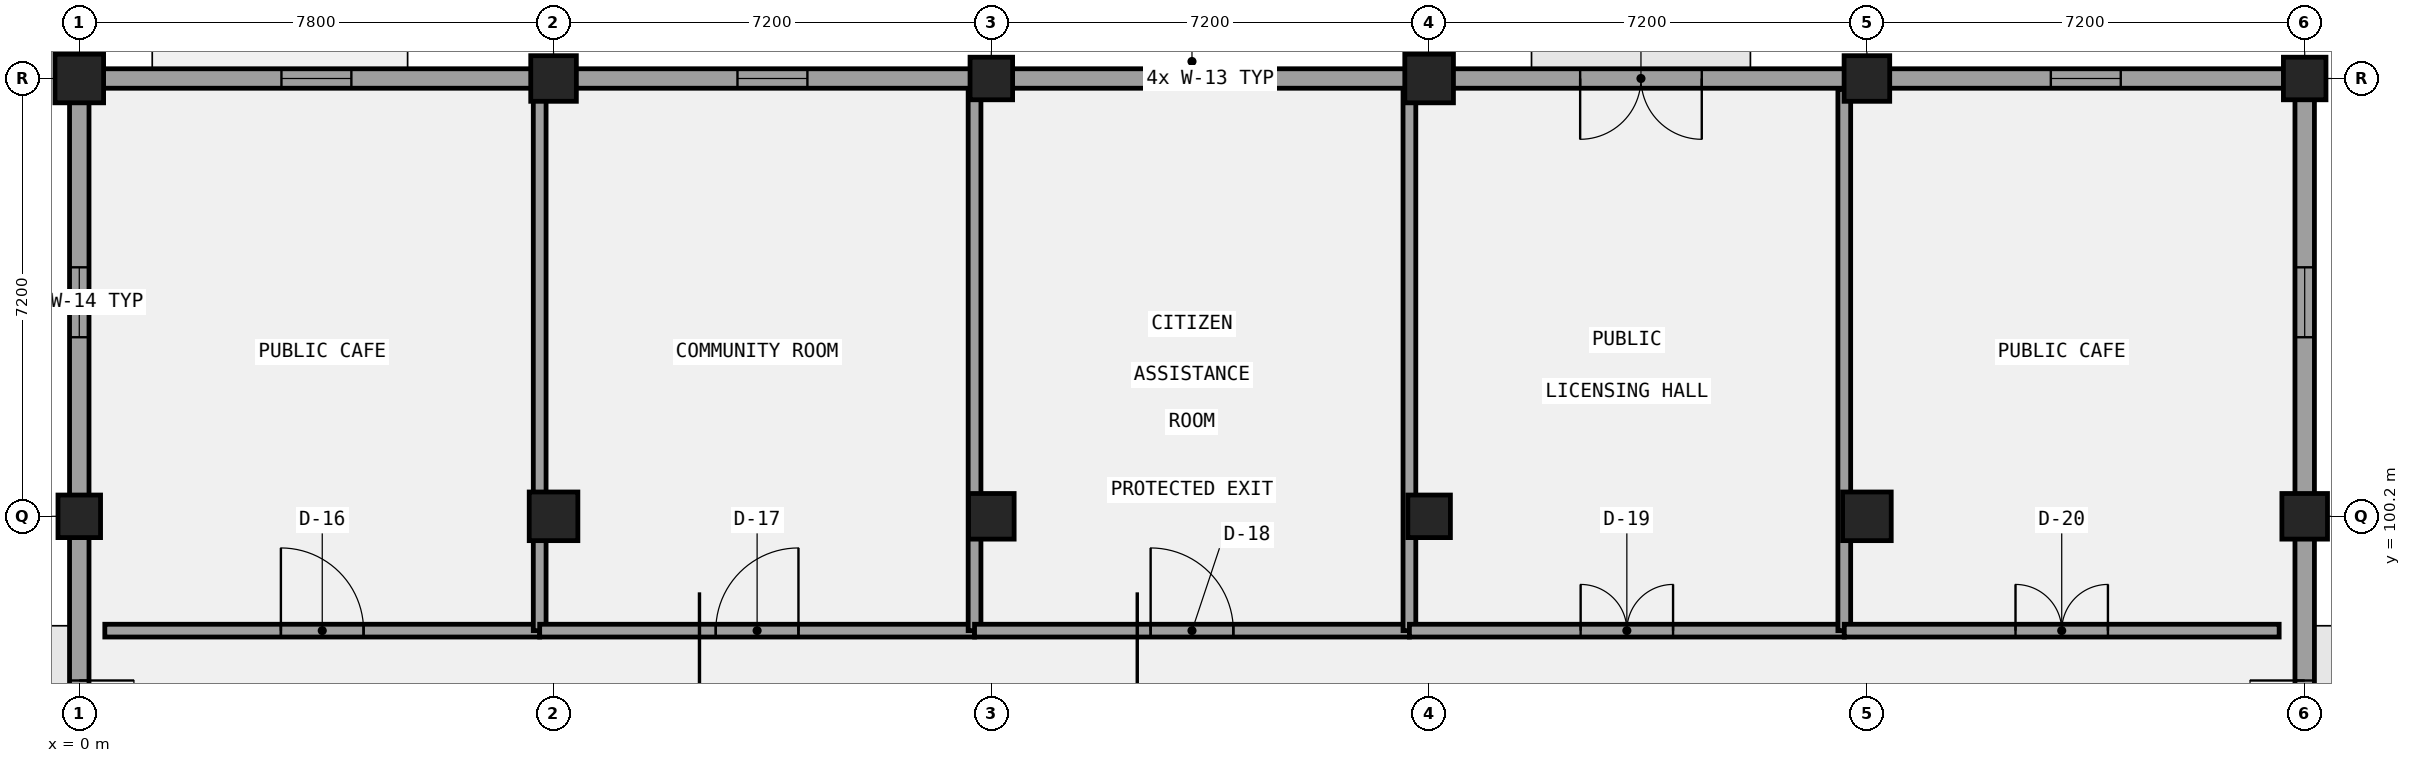
"""IFC4 building model, lengths in metres.
Left out: names, types, materials, properties, quantities, classifications, styles, units other than length and angle.
Written with IfcOpenShell. Run it as: python <this file> out.ifc"""

import sys

from ifc_helpers import new_model, si_unit, direction, frame, frame_2d, origin, origin_2d, place, context, subcontext, project, spatial, rectangle, extrude, element, fill, save


model = new_model("IFC4")
c1 = context("Model", 3, precision=1e-05, world=origin(), true_north=direction((0.0, 1.0)))
c2 = subcontext(c1, "Body", "Model", "MODEL_VIEW")
j1 = project(units=[si_unit("LENGTHUNIT", "METRE"), si_unit("PLANEANGLEUNIT", "RADIAN")], contexts=[c1])
p1 = place(None, origin())
s1 = spatial("IfcSite", under=j1, at=p1, CompositionType="ELEMENT")
p2 = place(p1, origin())
s2 = spatial("IfcBuilding", under=s1, at=p2, CompositionType="ELEMENT")
p3 = place(p2, origin())
s3 = spatial("IfcBuildingStorey", under=s2, at=p3, CompositionType="ELEMENT", Elevation=0.0)
p4 = place(p3, frame((0.0, 100.2, -0.32), z_axis=(0.0, 0.0, 1.0), x_axis=(1.0, 0.0, 0.0)))
e1 = element("IfcColumn", 1, at=p4, inside=s3, PredefinedType="COLUMN", context=c2, shape_type="SweptSolid", body=[
    extrude(rectangle(XDim=0.7, YDim=0.7, at=origin_2d()), origin(), (0.0, 0.0, 1.0), 5.72),
])
for number, where, z_axis, x_axis in (
    (2, (0.0, 107.4, -0.32), (0.0, 0.0, 1.0), (1.0, 0.0, 0.0)),
    (3, (7.8, 100.2, -0.32), (0.0, 0.0, 1.0), (1.0, 0.0, 0.0)),
):
    element("IfcColumn", number, at=place(p3, frame(where, z_axis=z_axis, x_axis=x_axis)), inside=s3, PredefinedType="COLUMN", context=c2, shape_type="SweptSolid", body=[
        extrude(rectangle(XDim=0.8, YDim=0.8, at=origin_2d()), origin(), (0.0, 0.0, 1.0), 5.72),
    ])
for number, where, z_axis, x_axis in (
    (4, (7.8, 107.4, -0.32), (0.0, 0.0, 1.0), (1.0, 0.0, 0.0)),
    (5, (15.0, 100.2, -0.32), (0.0, 0.0, 1.0), (1.0, 0.0, 0.0)),
):
    element("IfcColumn", number, at=place(p3, frame(where, z_axis=z_axis, x_axis=x_axis)), inside=s3, PredefinedType="COLUMN", context=c2, shape_type="SweptSolid", body=[
        extrude(rectangle(XDim=0.75, YDim=0.75, at=origin_2d()), origin(), (0.0, 0.0, 1.0), 5.72),
    ])
for number, where, z_axis, x_axis in (
    (6, (15.0, 107.4, -0.32), (0.0, 0.0, 1.0), (1.0, 0.0, 0.0)),
    (7, (22.2, 100.2, -0.32), (0.0, 0.0, 1.0), (1.0, 0.0, 0.0)),
):
    element("IfcColumn", number, at=place(p3, frame(where, z_axis=z_axis, x_axis=x_axis)), inside=s3, PredefinedType="COLUMN", context=c2, shape_type="SweptSolid", body=[
        extrude(rectangle(XDim=0.7, YDim=0.7, at=origin_2d()), origin(), (0.0, 0.0, 1.0), 5.72),
    ])
for number, where, z_axis, x_axis in (
    (8, (22.2, 107.4, -0.32), (0.0, 0.0, 1.0), (1.0, 0.0, 0.0)),
    (9, (29.4, 100.2, -0.32), (0.0, 0.0, 1.0), (1.0, 0.0, 0.0)),
):
    element("IfcColumn", number, at=place(p3, frame(where, z_axis=z_axis, x_axis=x_axis)), inside=s3, PredefinedType="COLUMN", context=c2, shape_type="SweptSolid", body=[
        extrude(rectangle(XDim=0.8, YDim=0.8, at=origin_2d()), origin(), (0.0, 0.0, 1.0), 5.72),
    ])
for number, where, z_axis, x_axis in (
    (10, (29.4, 107.4, -0.32), (0.0, 0.0, 1.0), (1.0, 0.0, 0.0)),
    (11, (36.6, 100.2, -0.32), (0.0, 0.0, 1.0), (1.0, 0.0, 0.0)),
):
    element("IfcColumn", number, at=place(p3, frame(where, z_axis=z_axis, x_axis=x_axis)), inside=s3, PredefinedType="COLUMN", context=c2, shape_type="SweptSolid", body=[
        extrude(rectangle(XDim=0.75, YDim=0.75, at=origin_2d()), origin(), (0.0, 0.0, 1.0), 5.72),
    ])
p5 = place(p3, frame((36.6, 107.4, -0.32), z_axis=(0.0, 0.0, 1.0), x_axis=(1.0, 0.0, 0.0)))
e12 = element("IfcColumn", 12, at=p5, inside=s3, PredefinedType="COLUMN", context=c2, shape_type="SweptSolid", body=[
    extrude(rectangle(XDim=0.7, YDim=0.7, at=origin_2d()), origin(), (0.0, 0.0, 1.0), 5.72),
])
p6 = place(p3, frame((36.6, 85.96, 0.0), z_axis=(0.0, 0.0, 1.0), x_axis=(0.0, 1.0, 0.0)))
e13 = element("IfcWall", 13, at=p6, inside=s3, PredefinedType="SOLIDWALL", context=c2, shape_type="SweptSolid", body=[
    extrude(rectangle(XDim=21.28, YDim=0.32, at=frame_2d((10.64, 0.0))), origin(), (0.0, 0.0, 1.0), 4.27),
])
p7 = place(p6, frame((9.74, 0.0, 0.0)))
e14 = element("IfcOpeningElement", 14, at=p7, cuts=e13, PredefinedType="OPENING", context=c2, shape_type="SweptSolid", body=[
    extrude(rectangle(XDim=1.8, YDim=2.4, at=frame_2d((0.9, 1.2))), frame((0.0, 0.17, 0.0), z_axis=(0.0, -1.0, 0.0), x_axis=(1.0, 0.0, 0.0)), (0.0, 0.0, 1.0), 0.34),
])
p8 = place(p6, frame((2.945, 0.0, 1.0)))
e15 = element("IfcOpeningElement", 15, at=p8, cuts=e13, PredefinedType="OPENING", context=c2, shape_type="SweptSolid", body=[
    extrude(rectangle(XDim=1.15, YDim=1.65, at=frame_2d((0.575, 0.825))), frame((0.0, 0.17, 0.0), z_axis=(0.0, -1.0, 0.0), x_axis=(1.0, 0.0, 0.0)), (0.0, 0.0, 1.0), 0.34),
])
p9 = place(p6, frame((17.185, 0.0, 1.0)))
e16 = element("IfcOpeningElement", 16, at=p9, cuts=e13, PredefinedType="OPENING", context=c2, shape_type="SweptSolid", body=[
    extrude(rectangle(XDim=1.15, YDim=1.65, at=frame_2d((0.575, 0.825))), frame((0.0, 0.17, 0.0), z_axis=(0.0, -1.0, 0.0), x_axis=(1.0, 0.0, 0.0)), (0.0, 0.0, 1.0), 0.34),
])
p10 = place(p3, frame((36.76, 107.4, 0.0), z_axis=(0.0, 0.0, 1.0), x_axis=(-1.0, 0.0, 0.0)))
e17 = element("IfcWall", 17, at=p10, inside=s3, PredefinedType="SOLIDWALL", context=c2, shape_type="SweptSolid", body=[
    extrude(rectangle(XDim=36.92, YDim=0.32, at=frame_2d((18.46, 0.0))), origin(), (0.0, 0.0, 1.0), 4.12),
])
p11 = place(p10, frame((10.076, 0.0, 0.0)))
e18 = element("IfcOpeningElement", 18, at=p11, cuts=e17, PredefinedType="OPENING", context=c2, shape_type="SweptSolid", body=[
    extrude(rectangle(XDim=2.0, YDim=2.6, at=frame_2d((1.0, 1.3))), frame((0.0, 0.17, 0.0), z_axis=(0.0, -1.0, 0.0), x_axis=(1.0, 0.0, 0.0)), (0.0, 0.0, 1.0), 0.34),
])
p12 = place(p10, frame((32.285, 0.0, 1.0)))
e19 = element("IfcOpeningElement", 19, at=p12, cuts=e17, PredefinedType="OPENING", context=c2, shape_type="SweptSolid", body=[
    extrude(rectangle(XDim=1.15, YDim=1.9, at=frame_2d((0.575, 0.95))), frame((0.0, 0.17, 0.0), z_axis=(0.0, -1.0, 0.0), x_axis=(1.0, 0.0, 0.0)), (0.0, 0.0, 1.0), 0.34),
])
p13 = place(p10, frame((24.785, 0.0, 1.0)))
e20 = element("IfcOpeningElement", 20, at=p13, cuts=e17, PredefinedType="OPENING", context=c2, shape_type="SweptSolid", body=[
    extrude(rectangle(XDim=1.15, YDim=1.9, at=frame_2d((0.575, 0.95))), frame((0.0, 0.17, 0.0), z_axis=(0.0, -1.0, 0.0), x_axis=(1.0, 0.0, 0.0)), (0.0, 0.0, 1.0), 0.34),
])
p14 = place(p10, frame((17.585, 0.0, 1.0)))
e21 = element("IfcOpeningElement", 21, at=p14, cuts=e17, PredefinedType="OPENING", context=c2, shape_type="SweptSolid", body=[
    extrude(rectangle(XDim=1.15, YDim=1.9, at=frame_2d((0.575, 0.95))), frame((0.0, 0.17, 0.0), z_axis=(0.0, -1.0, 0.0), x_axis=(1.0, 0.0, 0.0)), (0.0, 0.0, 1.0), 0.34),
])
p15 = place(p10, frame((3.185, 0.0, 1.0)))
e22 = element("IfcOpeningElement", 22, at=p15, cuts=e17, PredefinedType="OPENING", context=c2, shape_type="SweptSolid", body=[
    extrude(rectangle(XDim=1.15, YDim=1.9, at=frame_2d((0.575, 0.95))), frame((0.0, 0.17, 0.0), z_axis=(0.0, -1.0, 0.0), x_axis=(1.0, 0.0, 0.0)), (0.0, 0.0, 1.0), 0.34),
])
p16 = place(p3, frame((0.0, 107.24, 0.0), z_axis=(0.0, 0.0, 1.0), x_axis=(0.0, -1.0, 0.0)))
e23 = element("IfcWall", 23, at=p16, inside=s3, PredefinedType="SOLIDWALL", context=c2, shape_type="SweptSolid", body=[
    extrude(rectangle(XDim=21.28, YDim=0.32, at=frame_2d((10.64, 0.0))), origin(), (0.0, 0.0, 1.0), 4.37),
])
p17 = place(p16, frame((9.74, 0.0, 0.0)))
e24 = element("IfcOpeningElement", 24, at=p17, cuts=e23, PredefinedType="OPENING", context=c2, shape_type="SweptSolid", body=[
    extrude(rectangle(XDim=1.8, YDim=2.4, at=frame_2d((0.9, 1.2))), frame((0.0, 0.17, 0.0), z_axis=(0.0, -1.0, 0.0), x_axis=(1.0, 0.0, 0.0)), (0.0, 0.0, 1.0), 0.34),
])
p18 = place(p16, frame((17.185, 0.0, 1.0)))
e25 = element("IfcOpeningElement", 25, at=p18, cuts=e23, PredefinedType="OPENING", context=c2, shape_type="SweptSolid", body=[
    extrude(rectangle(XDim=1.15, YDim=2.15, at=frame_2d((0.575, 1.075))), frame((0.0, 0.17, 0.0), z_axis=(0.0, -1.0, 0.0), x_axis=(1.0, 0.0, 0.0)), (0.0, 0.0, 1.0), 0.34),
])
p19 = place(p16, frame((2.945, 0.0, 1.0)))
e26 = element("IfcOpeningElement", 26, at=p19, cuts=e23, PredefinedType="OPENING", context=c2, shape_type="SweptSolid", body=[
    extrude(rectangle(XDim=1.15, YDim=2.15, at=frame_2d((0.575, 1.075))), frame((0.0, 0.17, 0.0), z_axis=(0.0, -1.0, 0.0), x_axis=(1.0, 0.0, 0.0)), (0.0, 0.0, 1.0), 0.34),
])
p20 = place(p3, frame((0.42, 98.32, 0.0), z_axis=(0.0, 0.0, 1.0), x_axis=(1.0, 0.0, 0.0)))
e27 = element("IfcWall", 27, at=p20, inside=s3, PredefinedType="PARTITIONING", context=c2, shape_type="SweptSolid", body=[
    extrude(rectangle(XDim=7.152, YDim=0.21, at=frame_2d((3.576, 0.0))), origin(), (0.0, 0.0, 1.0), 4.57),
])
p21 = place(p20, frame((2.896, 0.0, 0.0)))
e28 = element("IfcOpeningElement", 28, at=p21, cuts=e27, PredefinedType="OPENING", context=c2, shape_type="SweptSolid", body=[
    extrude(rectangle(XDim=1.36, YDim=2.1, at=frame_2d((0.68, 1.05))), frame((0.0, 0.115, 0.0), z_axis=(0.0, -1.0, 0.0), x_axis=(1.0, 0.0, 0.0)), (0.0, 0.0, 1.0), 0.23),
])
p22 = place(p3, frame((7.572, 98.32, 0.0), z_axis=(0.0, 0.0, 1.0), x_axis=(0.0, 1.0, 0.0)))
e29 = element("IfcWall", 29, at=p22, inside=s3, PredefinedType="PARTITIONING", context=c2, shape_type="SweptSolid", body=[
    extrude(rectangle(XDim=8.9, YDim=0.21, at=frame_2d((4.45, 0.0))), origin(), (0.0, 0.0, 1.0), 4.47),
])
p23 = place(p3, frame((7.572, 98.32, 0.0), z_axis=(0.0, 0.0, 1.0), x_axis=(1.0, 0.0, 0.0)))
e30 = element("IfcWall", 30, at=p23, inside=s3, PredefinedType="PARTITIONING", context=c2, shape_type="SweptSolid", body=[
    extrude(rectangle(XDim=7.152, YDim=0.21, at=frame_2d((3.576, 0.0))), origin(), (0.0, 0.0, 1.0), 4.57),
])
p24 = place(p23, frame((2.896, 0.0, 0.0)))
e31 = element("IfcOpeningElement", 31, at=p24, cuts=e30, PredefinedType="OPENING", context=c2, shape_type="SweptSolid", body=[
    extrude(rectangle(XDim=1.36, YDim=2.22, at=frame_2d((0.68, 1.11))), frame((0.0, 0.115, 0.0), z_axis=(0.0, -1.0, 0.0), x_axis=(1.0, 0.0, 0.0)), (0.0, 0.0, 1.0), 0.23),
])
p25 = place(p3, frame((14.724, 98.32, 0.0), z_axis=(0.0, 0.0, 1.0), x_axis=(0.0, 1.0, 0.0)))
e32 = element("IfcWall", 32, at=p25, inside=s3, PredefinedType="PARTITIONING", context=c2, shape_type="SweptSolid", body=[
    extrude(rectangle(XDim=8.9, YDim=0.21, at=frame_2d((4.45, 0.0))), origin(), (0.0, 0.0, 1.0), 4.37),
])
p26 = place(p3, frame((14.724, 98.32, 0.0), z_axis=(0.0, 0.0, 1.0), x_axis=(1.0, 0.0, 0.0)))
e33 = element("IfcWall", 33, at=p26, inside=s3, PredefinedType="PARTITIONING", context=c2, shape_type="SweptSolid", body=[
    extrude(rectangle(XDim=7.152, YDim=0.21, at=frame_2d((3.576, 0.0))), origin(), (0.0, 0.0, 1.0), 4.57),
])
p27 = place(p26, frame((2.896, 0.0, 0.0)))
e34 = element("IfcOpeningElement", 34, at=p27, cuts=e33, PredefinedType="OPENING", context=c2, shape_type="SweptSolid", body=[
    extrude(rectangle(XDim=1.36, YDim=2.35, at=frame_2d((0.68, 1.175))), frame((0.0, 0.115, 0.0), z_axis=(0.0, -1.0, 0.0), x_axis=(1.0, 0.0, 0.0)), (0.0, 0.0, 1.0), 0.23),
])
p28 = place(p3, frame((21.876, 98.32, 0.0), z_axis=(0.0, 0.0, 1.0), x_axis=(0.0, 1.0, 0.0)))
e35 = element("IfcWall", 35, at=p28, inside=s3, PredefinedType="PARTITIONING", context=c2, shape_type="SweptSolid", body=[
    extrude(rectangle(XDim=8.9, YDim=0.21, at=frame_2d((4.45, 0.0))), origin(), (0.0, 0.0, 1.0), 4.37),
])
p29 = place(p3, frame((21.876, 98.32, 0.0), z_axis=(0.0, 0.0, 1.0), x_axis=(1.0, 0.0, 0.0)))
e36 = element("IfcWall", 36, at=p29, inside=s3, PredefinedType="PARTITIONING", context=c2, shape_type="SweptSolid", body=[
    extrude(rectangle(XDim=7.152, YDim=0.21, at=frame_2d((3.576, 0.0))), origin(), (0.0, 0.0, 1.0), 4.57),
])
p30 = place(p29, frame((2.816, 0.0, 0.0)))
e37 = element("IfcOpeningElement", 37, at=p30, cuts=e36, PredefinedType="OPENING", context=c2, shape_type="SweptSolid", body=[
    extrude(rectangle(XDim=1.52, YDim=2.1, at=frame_2d((0.76, 1.05))), frame((0.0, 0.115, 0.0), z_axis=(0.0, -1.0, 0.0), x_axis=(1.0, 0.0, 0.0)), (0.0, 0.0, 1.0), 0.23),
])
p31 = place(p3, frame((29.028, 98.32, 0.0), z_axis=(0.0, 0.0, 1.0), x_axis=(0.0, 1.0, 0.0)))
e38 = element("IfcWall", 38, at=p31, inside=s3, PredefinedType="PARTITIONING", context=c2, shape_type="SweptSolid", body=[
    extrude(rectangle(XDim=8.9, YDim=0.21, at=frame_2d((4.45, 0.0))), origin(), (0.0, 0.0, 1.0), 4.32),
])
p32 = place(p3, frame((29.028, 98.32, 0.0), z_axis=(0.0, 0.0, 1.0), x_axis=(1.0, 0.0, 0.0)))
e39 = element("IfcWall", 39, at=p32, inside=s3, PredefinedType="PARTITIONING", context=c2, shape_type="SweptSolid", body=[
    extrude(rectangle(XDim=7.152, YDim=0.21, at=frame_2d((3.576, 0.0))), origin(), (0.0, 0.0, 1.0), 4.57),
])
p33 = place(p32, frame((2.816, 0.0, 0.0)))
e40 = element("IfcOpeningElement", 40, at=p33, cuts=e39, PredefinedType="OPENING", context=c2, shape_type="SweptSolid", body=[
    extrude(rectangle(XDim=1.52, YDim=2.22, at=frame_2d((0.76, 1.11))), frame((0.0, 0.115, 0.0), z_axis=(0.0, -1.0, 0.0), x_axis=(1.0, 0.0, 0.0)), (0.0, 0.0, 1.0), 0.23),
])
p34 = place(p7, frame((1.8, 0.0, 0.0), z_axis=(0.0, 0.0, 1.0), x_axis=(-1.0, 0.0, 0.0)))
e41 = element("IfcDoor", 41, at=p34, inside=s3, OperationType="DOUBLE_DOOR_SINGLE_SWING", PredefinedType="DOOR", context=c2, shape_type="SweptSolid", body=[
    extrude(rectangle(XDim=1.8, YDim=2.4, at=frame_2d((0.9, 1.2))), frame((0.0, 0.025, 0.0), z_axis=(0.0, -1.0, 0.0), x_axis=(1.0, 0.0, 0.0)), (0.0, 0.0, 1.0), 0.05),
])
fill(e14, e41)
p35 = place(p9, origin())
e42 = element("IfcWindow", 42, at=p35, inside=s3, PartitioningType="SINGLE_PANEL", PredefinedType="WINDOW", context=c2, shape_type="SweptSolid", body=[
    extrude(rectangle(XDim=1.15, YDim=1.65, at=frame_2d((0.575, 0.825))), frame((0.0, 0.03, 0.0), z_axis=(0.0, -1.0, 0.0), x_axis=(1.0, 0.0, 0.0)), (0.0, 0.0, 1.0), 0.06),
])
fill(e16, e42)
p36 = place(p11, frame((2.0, 0.0, 0.0), z_axis=(0.0, 0.0, 1.0), x_axis=(-1.0, 0.0, 0.0)))
e43 = element("IfcDoor", 43, at=p36, inside=s3, OperationType="DOUBLE_DOOR_SINGLE_SWING", PredefinedType="DOOR", context=c2, shape_type="SweptSolid", body=[
    extrude(rectangle(XDim=2.0, YDim=2.6, at=frame_2d((1.0, 1.3))), frame((0.0, 0.025, 0.0), z_axis=(0.0, -1.0, 0.0), x_axis=(1.0, 0.0, 0.0)), (0.0, 0.0, 1.0), 0.05),
])
fill(e18, e43)
p37 = place(p12, origin())
e44 = element("IfcWindow", 44, at=p37, inside=s3, PartitioningType="SINGLE_PANEL", PredefinedType="WINDOW", context=c2, shape_type="SweptSolid", body=[
    extrude(rectangle(XDim=1.15, YDim=1.9, at=frame_2d((0.575, 0.95))), frame((0.0, 0.03, 0.0), z_axis=(0.0, -1.0, 0.0), x_axis=(1.0, 0.0, 0.0)), (0.0, 0.0, 1.0), 0.06),
])
fill(e19, e44)
p38 = place(p13, origin())
e45 = element("IfcWindow", 45, at=p38, inside=s3, PartitioningType="SINGLE_PANEL", PredefinedType="WINDOW", context=c2, shape_type="SweptSolid", body=[
    extrude(rectangle(XDim=1.15, YDim=1.9, at=frame_2d((0.575, 0.95))), frame((0.0, 0.03, 0.0), z_axis=(0.0, -1.0, 0.0), x_axis=(1.0, 0.0, 0.0)), (0.0, 0.0, 1.0), 0.06),
])
fill(e20, e45)
p39 = place(p14, origin())
e46 = element("IfcWindow", 46, at=p39, inside=s3, PartitioningType="SINGLE_PANEL", PredefinedType="WINDOW", context=c2, shape_type="SweptSolid", body=[
    extrude(rectangle(XDim=1.15, YDim=1.9, at=frame_2d((0.575, 0.95))), frame((0.0, 0.03, 0.0), z_axis=(0.0, -1.0, 0.0), x_axis=(1.0, 0.0, 0.0)), (0.0, 0.0, 1.0), 0.06),
])
fill(e21, e46)
p40 = place(p15, origin())
e47 = element("IfcWindow", 47, at=p40, inside=s3, PartitioningType="SINGLE_PANEL", PredefinedType="WINDOW", context=c2, shape_type="SweptSolid", body=[
    extrude(rectangle(XDim=1.15, YDim=1.9, at=frame_2d((0.575, 0.95))), frame((0.0, 0.03, 0.0), z_axis=(0.0, -1.0, 0.0), x_axis=(1.0, 0.0, 0.0)), (0.0, 0.0, 1.0), 0.06),
])
fill(e22, e47)
p41 = place(p17, frame((1.8, 0.0, 0.0), z_axis=(0.0, 0.0, 1.0), x_axis=(-1.0, 0.0, 0.0)))
e48 = element("IfcDoor", 48, at=p41, inside=s3, OperationType="DOUBLE_DOOR_SINGLE_SWING", PredefinedType="DOOR", context=c2, shape_type="SweptSolid", body=[
    extrude(rectangle(XDim=1.8, YDim=2.4, at=frame_2d((0.9, 1.2))), frame((0.0, 0.025, 0.0), z_axis=(0.0, -1.0, 0.0), x_axis=(1.0, 0.0, 0.0)), (0.0, 0.0, 1.0), 0.05),
])
fill(e24, e48)
p42 = place(p19, origin())
e49 = element("IfcWindow", 49, at=p42, inside=s3, PartitioningType="SINGLE_PANEL", PredefinedType="WINDOW", context=c2, shape_type="SweptSolid", body=[
    extrude(rectangle(XDim=1.15, YDim=2.15, at=frame_2d((0.575, 1.075))), frame((0.0, 0.03, 0.0), z_axis=(0.0, -1.0, 0.0), x_axis=(1.0, 0.0, 0.0)), (0.0, 0.0, 1.0), 0.06),
])
fill(e26, e49)
p43 = place(p21, origin())
e50 = element("IfcDoor", 50, at=p43, inside=s3, OperationType="SINGLE_SWING_LEFT", PredefinedType="DOOR", context=c2, shape_type="SweptSolid", body=[
    extrude(rectangle(XDim=1.36, YDim=2.1, at=frame_2d((0.68, 1.05))), frame((0.0, 0.025, 0.0), z_axis=(0.0, -1.0, 0.0), x_axis=(1.0, 0.0, 0.0)), (0.0, 0.0, 1.0), 0.05),
])
fill(e28, e50)
p44 = place(p24, origin())
e51 = element("IfcDoor", 51, at=p44, inside=s3, OperationType="SINGLE_SWING_RIGHT", PredefinedType="DOOR", context=c2, shape_type="SweptSolid", body=[
    extrude(rectangle(XDim=1.36, YDim=2.22, at=frame_2d((0.68, 1.11))), frame((0.0, 0.025, 0.0), z_axis=(0.0, -1.0, 0.0), x_axis=(1.0, 0.0, 0.0)), (0.0, 0.0, 1.0), 0.05),
])
fill(e31, e51)
p45 = place(p27, origin())
e52 = element("IfcDoor", 52, at=p45, inside=s3, OperationType="SINGLE_SWING_LEFT", PredefinedType="DOOR", context=c2, shape_type="SweptSolid", body=[
    extrude(rectangle(XDim=1.36, YDim=2.35, at=frame_2d((0.68, 1.175))), frame((0.0, 0.025, 0.0), z_axis=(0.0, -1.0, 0.0), x_axis=(1.0, 0.0, 0.0)), (0.0, 0.0, 1.0), 0.05),
])
fill(e34, e52)
p46 = place(p30, origin())
e53 = element("IfcDoor", 53, at=p46, inside=s3, OperationType="DOUBLE_DOOR_SINGLE_SWING", PredefinedType="DOOR", context=c2, shape_type="SweptSolid", body=[
    extrude(rectangle(XDim=1.52, YDim=2.1, at=frame_2d((0.76, 1.05))), frame((0.0, 0.025, 0.0), z_axis=(0.0, -1.0, 0.0), x_axis=(1.0, 0.0, 0.0)), (0.0, 0.0, 1.0), 0.05),
])
fill(e37, e53)
p47 = place(p33, origin())
e54 = element("IfcDoor", 54, at=p47, inside=s3, OperationType="DOUBLE_DOOR_SINGLE_SWING", PredefinedType="DOOR", context=c2, shape_type="SweptSolid", body=[
    extrude(rectangle(XDim=1.52, YDim=2.22, at=frame_2d((0.76, 1.11))), frame((0.0, 0.025, 0.0), z_axis=(0.0, -1.0, 0.0), x_axis=(1.0, 0.0, 0.0)), (0.0, 0.0, 1.0), 0.05),
])
fill(e40, e54)
save(model, sys.argv[1])
